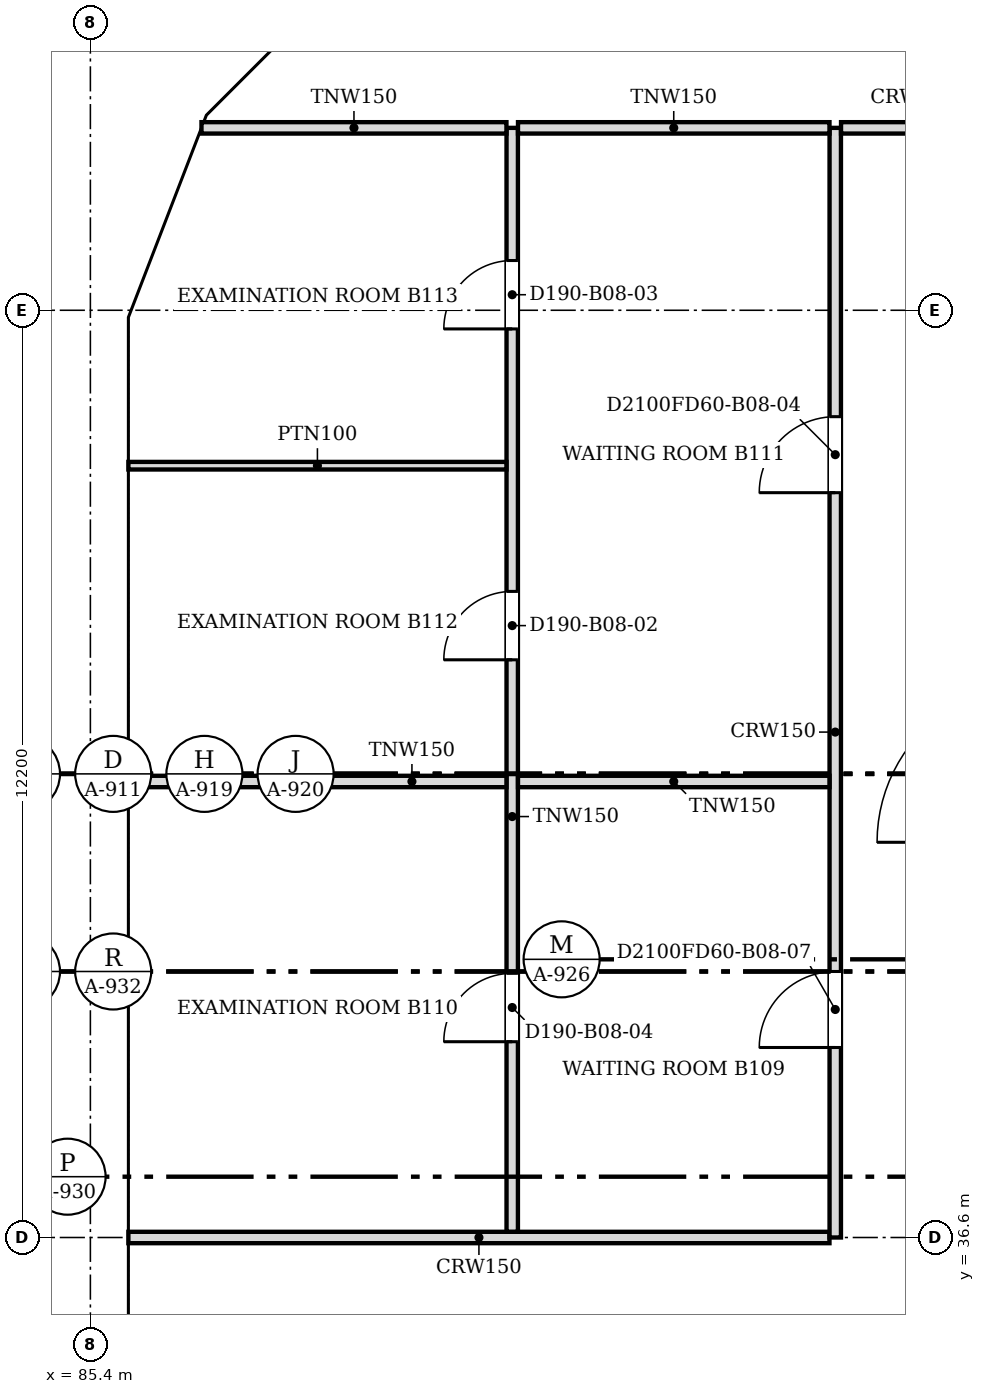
"""IFC4 building model, lengths in metres.
Left out: names, types, materials, properties, quantities, classifications, styles, units other than length and angle.
Written with IfcOpenShell. Run it as: python <this file> out.ifc"""

import sys

from ifc_helpers import new_model, si_unit, direction, frame, frame_2d, origin, place, context, subcontext, project, spatial, polyline, rectangle, outline, extrude, faceted_brep, source, transform, mapped, element, fill, save


model = new_model("IFC4")
c1 = context("Model", 3, precision=1e-05, world=origin(), true_north=direction((0.0, 1.0)))
c2 = subcontext(c1, "Body", "Model", "MODEL_VIEW")
j1 = project(units=[si_unit("LENGTHUNIT", "METRE"), si_unit("PLANEANGLEUNIT", "RADIAN")], contexts=[c1])
p1 = place(None, origin())
s1 = spatial("IfcSite", under=j1, at=p1, CompositionType="ELEMENT")
p2 = place(p1, origin())
s2 = spatial("IfcBuilding", under=s1, at=p2, CompositionType="ELEMENT")
p3 = place(p2, frame((0.0, 0.0, 80.0)))
s3 = spatial("IfcBuildingStorey", under=s2, at=p3, CompositionType="ELEMENT", Elevation=80.0)
m1 = source(origin(), c2, "Body", "Brep", [
    faceted_brep([(0.053, -0.25, 0.0), (2.997, -0.25, 3.8), (0.053, -0.25, 7.6), (0.0, -0.25, 7.532), (0.0, -0.25, 0.068), (0.106, 0.25, 7.532), (2.944, 0.25, 3.868), (2.944, 0.25, 3.732), (0.106, 0.25, 0.068), (2.997, 0.0, 3.8), (0.053, 0.0, 0.0), (0.053, 0.0, 7.6)], [[[0, 1, 2, 3, 4]], [[5, 6, 7, 8]], [[8, 7, 9, 1, 0, 10]], [[6, 5, 11, 2, 1, 9]], [[3, 2, 11]], [[10, 0, 4]], [[8, 10, 4, 3, 11, 5]], [[9, 7, 6]]]),
])
p4 = place(p3, frame((88.831, 53.625, -3.8), z_axis=(0.0, 0.0, 1.0), x_axis=(-0.707147509625, -0.707066050402, 0.0)))
e1 = element("IfcWall", 1, at=p4, inside=s3, PredefinedType="SOLIDWALL", context=c2, shape_type="MappedRepresentation", body=[
    mapped(m1, transform((0.0, 0.0, 0.0), scale=1.0)),
])
m2 = source(origin(), c2, "Body", "SweptSolid", [
    extrude(outline(polyline([(0.253, 0.666), (2.681, 3.8), (0.253, 6.934), (0.253, 0.666)])), frame((0.0, 0.26, 0.0), z_axis=(0.0, -1.0, 0.0), x_axis=(1.0, 0.0, 0.0)), (0.0, 0.0, 1.0), 0.52),
])
p5 = place(p4, origin())
e2 = element("IfcOpeningElement", 2, at=p5, cuts=e1, PredefinedType="OPENING", context=c2, shape_type="MappedRepresentation", body=[
    mapped(m2, transform((0.0, 0.0, 0.0), scale=1.0)),
])
m3 = source(origin(), c2, "Body", "Brep", [
    faceted_brep([(2.95, -0.25, 0.0), (2.997, -0.25, 0.059), (2.997, -0.25, 7.541), (2.95, -0.25, 7.6), (0.0, -0.25, 3.8), (0.053, 0.25, 3.868), (2.904, 0.25, 7.54), (2.904, 0.25, 0.06), (0.053, 0.25, 3.732), (2.95, 0.0, 0.0), (2.95, 0.0, 7.6), (0.0, 0.0, 3.8)], [[[0, 1, 2, 3, 4]], [[5, 6, 7, 8]], [[1, 0, 9]], [[10, 3, 2]], [[6, 5, 11, 4, 3, 10]], [[8, 7, 9, 0, 4, 11]], [[8, 11, 5]], [[1, 9, 7, 6, 10, 2]]]),
])
p6 = place(p3, frame((86.712, 51.506, -3.8), z_axis=(0.0, 0.0, 1.0), x_axis=(-0.359874094142, -0.933000876937, 0.0)))
e3 = element("IfcWall", 3, at=p6, inside=s3, PredefinedType="SOLIDWALL", context=c2, shape_type="MappedRepresentation", body=[
    mapped(m3, transform((0.0, 0.0, 0.0), scale=1.0)),
])
m4 = source(origin(), c2, "Body", "SweptSolid", [
    extrude(outline(polyline([(2.75, 6.935), (0.316, 3.8), (2.75, 0.665), (2.75, 6.935)])), frame((0.0, 0.26, 0.0), z_axis=(0.0, -1.0, 0.0), x_axis=(1.0, 0.0, 0.0)), (0.0, 0.0, 1.0), 0.52),
])
p7 = place(p6, origin())
e4 = element("IfcOpeningElement", 4, at=p7, cuts=e3, PredefinedType="OPENING", context=c2, shape_type="MappedRepresentation", body=[
    mapped(m4, transform((0.0, 0.0, 0.0), scale=1.0)),
])
m5 = source(origin(), c2, "Body", "Brep", [
    faceted_brep([(0.047, -0.25, 0.0), (3.05, -0.25, 3.8), (0.047, -0.25, 7.6), (0.0, -0.25, 7.54), (0.0, -0.25, 0.06), (0.093, 0.25, 7.541), (3.05, 0.25, 3.8), (0.093, 0.25, 0.059), (0.047, 0.0, 0.0), (0.047, 0.0, 7.6)], [[[0, 1, 2, 3, 4]], [[5, 6, 7]], [[7, 6, 1, 0, 8]], [[6, 5, 9, 2, 1]], [[3, 2, 9]], [[8, 0, 4]], [[7, 8, 4, 3, 9, 5]]]),
])
p8 = place(p3, frame((85.65, 48.8, -3.8), z_axis=(0.0, 0.0, 1.0), x_axis=(0.0, -1.0, 0.0)))
e5 = element("IfcWall", 5, at=p8, inside=s3, PredefinedType="SOLIDWALL", context=c2, shape_type="MappedRepresentation", body=[
    mapped(m5, transform((0.0, 0.0, 0.0), scale=1.0)),
])
m6 = source(origin(), c2, "Body", "SweptSolid", [
    extrude(outline(polyline([(0.247, 0.656), (2.731, 3.8), (0.247, 6.944), (0.247, 0.656)])), frame((0.0, 0.26, 0.0), z_axis=(0.0, -1.0, 0.0), x_axis=(1.0, 0.0, 0.0)), (0.0, 0.0, 1.0), 0.52),
])
p9 = place(p8, origin())
e6 = element("IfcOpeningElement", 6, at=p9, cuts=e5, PredefinedType="OPENING", context=c2, shape_type="MappedRepresentation", body=[
    mapped(m6, transform((0.0, 0.0, 0.0), scale=1.0)),
])
m7 = source(origin(), c2, "Body", "SweptSolid", [
    extrude(outline(polyline([(3.05, 0.0), (6.1, 3.8), (3.05, 7.6), (0.0, 3.8), (3.05, 0.0)])), frame((0.0, 0.25, 0.0), z_axis=(0.0, -1.0, 0.0), x_axis=(1.0, 0.0, 0.0)), (0.0, 0.0, 1.0), 0.5),
])
p10 = place(p3, frame((85.65, 45.75, -3.8), z_axis=(0.0, 0.0, 1.0), x_axis=(0.0, -1.0, 0.0)))
e7 = element("IfcWall", 7, at=p10, inside=s3, PredefinedType="SOLIDWALL", context=c2, shape_type="MappedRepresentation", body=[
    mapped(m7, transform((0.0, 0.0, 0.0), scale=1.0)),
])
m8 = source(origin(), c2, "Body", "SweptSolid", [
    extrude(outline(polyline([(3.05, 0.399), (5.78, 3.8), (3.05, 7.201), (0.321, 3.8), (3.05, 0.399)])), frame((0.0, 0.26, 0.0), z_axis=(0.0, -1.0, 0.0), x_axis=(1.0, 0.0, 0.0)), (0.0, 0.0, 1.0), 0.52),
])
p11 = place(p10, origin())
e8 = element("IfcOpeningElement", 8, at=p11, cuts=e7, PredefinedType="OPENING", context=c2, shape_type="MappedRepresentation", body=[
    mapped(m8, transform((0.0, 0.0, 0.0), scale=1.0)),
])
m9 = source(origin(), c2, "Body", "Brep", [
    faceted_brep([(3.05, -0.25, 0.0), (6.1, -0.25, 3.8), (6.1, -0.25, 3.8), (3.05, -0.25, 7.6), (0.0, -0.25, 3.8), (0.0, 0.25, 3.8), (3.05, 0.25, 7.6), (6.1, 0.25, 3.8), (6.1, 0.25, 3.8), (3.05, 0.25, 0.0)], [[[0, 1, 2, 3, 4]], [[5, 6, 7, 8, 9]], [[9, 8, 1, 0]], [[7, 6, 3, 2]], [[6, 5, 4, 3]], [[5, 9, 0, 4]], [[1, 8, 7, 2]]]),
])
p12 = place(p3, frame((85.65, 39.65, -3.8), z_axis=(0.0, 0.0, 1.0), x_axis=(0.0, -1.0, 0.0)))
e9 = element("IfcWall", 9, at=p12, inside=s3, PredefinedType="SOLIDWALL", context=c2, shape_type="MappedRepresentation", body=[
    mapped(m9, transform((0.0, 0.0, 0.0), scale=1.0)),
])
p13 = place(p12, origin())
e10 = element("IfcOpeningElement", 10, at=p13, cuts=e9, PredefinedType="OPENING", context=c2, shape_type="MappedRepresentation", body=[
    mapped(m8, transform((0.0, 0.0, 0.0), scale=1.0)),
])
p14 = place(p2, frame((0.0, 0.0, 83.8)))
s4 = spatial("IfcBuildingStorey", under=s2, at=p14, CompositionType="ELEMENT", Elevation=83.8)
m10 = source(origin(), c2, "Body", "Brep", [
    faceted_brep([(2.944, -0.25, 0.0), (2.997, -0.25, 0.068), (2.997, -0.25, 7.532), (2.944, -0.25, 7.6), (0.0, -0.25, 3.8), (0.053, 0.25, 3.868), (2.891, 0.25, 7.532), (2.891, 0.25, 0.068), (0.053, 0.25, 3.732), (2.944, 0.0, 0.0), (2.944, 0.0, 7.6), (0.0, 0.0, 3.8)], [[[0, 1, 2, 3, 4]], [[5, 6, 7, 8]], [[1, 0, 9]], [[10, 3, 2]], [[6, 5, 11, 4, 3, 10]], [[8, 7, 9, 0, 4, 11]], [[8, 11, 5]], [[1, 9, 7, 6, 10, 2]]]),
])
p15 = place(p14, frame((88.794, 53.588, -3.8), z_axis=(0.0, 0.0, 1.0), x_axis=(-0.707066050402, -0.707147509625, 0.0)))
e11 = element("IfcWall", 11, at=p15, inside=s4, PredefinedType="SOLIDWALL", context=c2, shape_type="MappedRepresentation", body=[
    mapped(m10, transform((0.0, 0.0, 0.0), scale=1.0)),
])
m11 = source(origin(), c2, "Body", "SweptSolid", [
    extrude(outline(polyline([(2.744, 6.934), (0.316, 3.8), (2.744, 0.666), (2.744, 6.934)])), frame((0.0, 0.26, 0.0), z_axis=(0.0, -1.0, 0.0), x_axis=(1.0, 0.0, 0.0)), (0.0, 0.0, 1.0), 0.52),
])
p16 = place(p15, origin())
e12 = element("IfcOpeningElement", 12, at=p16, cuts=e11, PredefinedType="OPENING", context=c2, shape_type="MappedRepresentation", body=[
    mapped(m11, transform((0.0, 0.0, 0.0), scale=1.0)),
])
m12 = source(origin(), c2, "Body", "Brep", [
    faceted_brep([(0.053, -0.25, 0.0), (3.003, -0.25, 3.8), (0.053, -0.25, 7.6), (0.0, -0.25, 7.532), (0.0, -0.25, 0.068), (0.106, 0.25, 7.532), (2.957, 0.25, 3.86), (2.957, 0.25, 3.74), (0.106, 0.25, 0.068), (3.003, 0.0, 3.8), (0.053, 0.0, 0.0), (0.053, 0.0, 7.6)], [[[0, 1, 2, 3, 4]], [[5, 6, 7, 8]], [[8, 7, 9, 1, 0, 10]], [[6, 5, 11, 2, 1, 9]], [[3, 2, 11]], [[10, 0, 4]], [[8, 10, 4, 3, 11, 5]], [[9, 7, 6]]]),
])
p17 = place(p14, frame((86.731, 51.556, -3.8), z_axis=(0.0, 0.0, 1.0), x_axis=(-0.359855894603, -0.933007896601, 0.0)))
e13 = element("IfcWall", 13, at=p17, inside=s4, PredefinedType="SOLIDWALL", context=c2, shape_type="MappedRepresentation", body=[
    mapped(m12, transform((0.0, 0.0, 0.0), scale=1.0)),
])
m13 = source(origin(), c2, "Body", "SweptSolid", [
    extrude(outline(polyline([(0.253, 0.665), (2.687, 3.8), (0.253, 6.935), (0.253, 0.665)])), frame((0.0, 0.26, 0.0), z_axis=(0.0, -1.0, 0.0), x_axis=(1.0, 0.0, 0.0)), (0.0, 0.0, 1.0), 0.52),
])
p18 = place(p17, origin())
e14 = element("IfcOpeningElement", 14, at=p18, cuts=e13, PredefinedType="OPENING", context=c2, shape_type="MappedRepresentation", body=[
    mapped(m13, transform((0.0, 0.0, 0.0), scale=1.0)),
])
m14 = source(origin(), c2, "Body", "Brep", [
    faceted_brep([(3.003, -0.25, 0.0), (6.053, -0.25, 3.8), (3.003, -0.25, 7.6), (0.0, -0.25, 3.8), (0.047, 0.25, 3.859), (3.003, 0.25, 7.6), (6.053, 0.25, 3.8), (3.003, 0.25, 0.0), (0.047, 0.25, 3.741), (0.0, 0.0, 3.8)], [[[0, 1, 2, 3]], [[4, 5, 6, 7, 8]], [[7, 6, 1, 0]], [[6, 5, 2, 1]], [[5, 4, 9, 3, 2]], [[8, 7, 0, 3, 9]], [[8, 9, 4]]]),
])
p19 = place(p14, frame((85.65, 48.753, -3.8), z_axis=(0.0, 0.0, 1.0), x_axis=(0.0, -1.0, 0.0)))
e15 = element("IfcWall", 15, at=p19, inside=s4, PredefinedType="SOLIDWALL", context=c2, shape_type="MappedRepresentation", body=[
    mapped(m14, transform((0.0, 0.0, 0.0), scale=1.0)),
])
m15 = source(origin(), c2, "Body", "SweptSolid", [
    extrude(outline(polyline([(3.005, 0.401), (5.733, 3.8), (3.005, 7.199), (0.319, 3.8), (3.005, 0.401)])), frame((0.0, 0.26, 0.0), z_axis=(0.0, -1.0, 0.0), x_axis=(1.0, 0.0, 0.0)), (0.0, 0.0, 1.0), 0.52),
])
p20 = place(p19, origin())
e16 = element("IfcOpeningElement", 16, at=p20, cuts=e15, PredefinedType="OPENING", context=c2, shape_type="MappedRepresentation", body=[
    mapped(m15, transform((0.0, 0.0, 0.0), scale=1.0)),
])
p21 = place(p14, frame((85.65, 42.7, -3.8), z_axis=(0.0, 0.0, 1.0), x_axis=(0.0, -1.0, 0.0)))
e17 = element("IfcWall", 17, at=p21, inside=s4, PredefinedType="SOLIDWALL", context=c2, shape_type="MappedRepresentation", body=[
    mapped(m9, transform((0.0, 0.0, 0.0), scale=1.0)),
])
p22 = place(p21, origin())
e18 = element("IfcOpeningElement", 18, at=p22, cuts=e17, PredefinedType="OPENING", context=c2, shape_type="MappedRepresentation", body=[
    mapped(m8, transform((0.0, 0.0, 0.0), scale=1.0)),
])
p23 = place(p14, frame((85.65, 36.6, -3.8), z_axis=(0.0, 0.0, 1.0), x_axis=(0.0, -1.0, 0.0)))
e19 = element("IfcWall", 19, at=p23, inside=s4, PredefinedType="SOLIDWALL", context=c2, shape_type="MappedRepresentation", body=[
    mapped(m7, transform((0.0, 0.0, 0.0), scale=1.0)),
])
p24 = place(p23, origin())
e20 = element("IfcOpeningElement", 20, at=p24, cuts=e19, PredefinedType="OPENING", context=c2, shape_type="MappedRepresentation", body=[
    mapped(m8, transform((0.0, 0.0, 0.0), scale=1.0)),
])
p25 = place(p3, frame((85.9, 36.6, 0.0), z_axis=(0.0, 0.0, 1.0), x_axis=(1.0, 0.0, 0.0)))
e21 = element("IfcWall", 21, at=p25, inside=s3, PredefinedType="PARTITIONING", context=c2, shape_type="SweptSolid", body=[
    extrude(rectangle(XDim=9.224, YDim=0.15, at=frame_2d((4.612, 0.0))), origin(), (0.0, 0.0, 1.0), 3.067),
])
p26 = place(p3, frame((95.2, 36.6, 0.0), z_axis=(0.0, 0.0, 1.0), x_axis=(0.0, 1.0, 0.0)))
e22 = element("IfcWall", 22, at=p26, inside=s3, PredefinedType="PARTITIONING", context=c2, shape_type="SweptSolid", body=[
    extrude(rectangle(XDim=14.6, YDim=0.15, at=frame_2d((7.3, 0.0))), origin(), (0.0, 0.0, 1.0), 3.067),
])
m16 = source(origin(), c2, "Body", "SweptSolid", [
    extrude(rectangle(XDim=1.0, YDim=2.1, at=frame_2d((0.5, 1.05))), frame((0.0, 0.085, 0.0), z_axis=(0.0, -1.0, 0.0), x_axis=(1.0, 0.0, 0.0)), (0.0, 0.0, 1.0), 0.17),
])
p27 = place(p26, frame((9.8, 0.0, 0.0)))
e23 = element("IfcOpeningElement", 23, at=p27, cuts=e22, PredefinedType="OPENING", context=c2, shape_type="MappedRepresentation", body=[
    mapped(m16, transform((0.0, 0.0, 0.0), scale=1.0)),
])
p28 = place(p26, frame((2.5, 0.0, 0.0)))
e24 = element("IfcOpeningElement", 24, at=p28, cuts=e22, PredefinedType="OPENING", context=c2, shape_type="MappedRepresentation", body=[
    mapped(m16, transform((0.0, 0.0, 0.0), scale=1.0)),
])
p29 = place(p3, frame((90.95, 36.676, 0.0), z_axis=(0.0, 0.0, 1.0), x_axis=(0.0, 1.0, 0.0)))
e25 = element("IfcWall", 25, at=p29, inside=s3, PredefinedType="PARTITIONING", context=c2, shape_type="SweptSolid", body=[
    extrude(rectangle(XDim=14.524, YDim=0.15, at=frame_2d((7.262, 0.0))), origin(), (0.0, 0.0, 1.0), 3.067),
])
m17 = source(origin(), c2, "Body", "SweptSolid", [
    extrude(rectangle(XDim=0.9, YDim=2.1, at=frame_2d((0.45, 1.05))), frame((0.0, 0.085, 0.0), z_axis=(0.0, -1.0, 0.0), x_axis=(1.0, 0.0, 0.0)), (0.0, 0.0, 1.0), 0.17),
])
p30 = place(p29, frame((7.525, 0.0, 0.0)))
e26 = element("IfcOpeningElement", 26, at=p30, cuts=e25, PredefinedType="OPENING", context=c2, shape_type="MappedRepresentation", body=[
    mapped(m17, transform((0.0, 0.0, 0.0), scale=1.0)),
])
p31 = place(p29, frame((11.879, 0.0, 0.0)))
e27 = element("IfcOpeningElement", 27, at=p31, cuts=e25, PredefinedType="OPENING", context=c2, shape_type="MappedRepresentation", body=[
    mapped(m17, transform((0.0, 0.0, 0.0), scale=1.0)),
])
p32 = place(p29, frame((2.5, 0.0, 0.0)))
e28 = element("IfcOpeningElement", 28, at=p32, cuts=e25, PredefinedType="OPENING", context=c2, shape_type="MappedRepresentation", body=[
    mapped(m17, transform((0.0, 0.0, 0.0), scale=1.0)),
])
p33 = place(p3, frame((85.9, 42.6, 0.0), z_axis=(0.0, 0.0, 1.0), x_axis=(1.0, 0.0, 0.0)))
e29 = element("IfcWall", 29, at=p33, inside=s3, PredefinedType="PARTITIONING", context=c2, shape_type="SweptSolid", body=[
    extrude(rectangle(XDim=4.974, YDim=0.15, at=frame_2d((2.487, 0.0))), origin(), (0.0, 0.0, 1.0), 3.067),
])
p34 = place(p3, frame((91.026, 42.6, 0.0), z_axis=(0.0, 0.0, 1.0), x_axis=(1.0, 0.0, 0.0)))
e30 = element("IfcWall", 30, at=p34, inside=s3, PredefinedType="PARTITIONING", context=c2, shape_type="SweptSolid", body=[
    extrude(rectangle(XDim=4.098, YDim=0.15, at=frame_2d((2.049, 0.0))), origin(), (0.0, 0.0, 1.0), 3.067),
])
p35 = place(p3, frame((85.9, 46.755, 0.0), z_axis=(0.0, 0.0, 1.0), x_axis=(1.0, 0.0, 0.0)))
e31 = element("IfcWall", 31, at=p35, inside=s3, PredefinedType="PARTITIONING", context=c2, shape_type="SweptSolid", body=[
    extrude(rectangle(XDim=4.974, YDim=0.1, at=frame_2d((2.487, 0.0))), origin(), (0.0, 0.0, 1.0), 3.067),
])
p36 = place(p3, frame((86.862, 51.2, 0.0), z_axis=(0.0, 0.0, 1.0), x_axis=(1.0, 0.0, 0.0)))
e32 = element("IfcWall", 32, at=p36, inside=s3, PredefinedType="PARTITIONING", context=c2, shape_type="SweptSolid", body=[
    extrude(rectangle(XDim=4.012, YDim=0.15, at=frame_2d((2.006, 0.0))), origin(), (0.0, 0.0, 1.0), 3.067),
])
p37 = place(p3, frame((91.026, 51.2, 0.0), z_axis=(0.0, 0.0, 1.0), x_axis=(1.0, 0.0, 0.0)))
e33 = element("IfcWall", 33, at=p37, inside=s3, PredefinedType="PARTITIONING", context=c2, shape_type="SweptSolid", body=[
    extrude(rectangle(XDim=4.098, YDim=0.15, at=frame_2d((2.049, 0.0))), origin(), (0.0, 0.0, 1.0), 3.067),
])
p38 = place(p3, frame((95.276, 51.2, 0.0), z_axis=(0.0, 0.0, 1.0), x_axis=(1.0, 0.0, 0.0)))
e34 = element("IfcWall", 34, at=p38, inside=s3, PredefinedType="PARTITIONING", context=c2, shape_type="SweptSolid", body=[
    extrude(rectangle(XDim=4.724, YDim=0.15, at=frame_2d((2.362, 0.0))), origin(), (0.0, 0.0, 1.0), 3.067),
])
p39 = place(p38, frame((1.9, 0.0, 0.0)))
e35 = element("IfcOpeningElement", 35, at=p39, cuts=e34, PredefinedType="OPENING", context=c2, shape_type="MappedRepresentation", body=[
    mapped(m16, transform((0.0, 0.0, 0.0), scale=1.0)),
])
m18 = source(origin(), c2, "Body", "SweptSolid", [
    extrude(rectangle(XDim=0.9, YDim=2.1, at=frame_2d((0.45, 1.05))), frame((0.0, 0.025, 0.0), z_axis=(0.0, -1.0, 0.0), x_axis=(1.0, 0.0, 0.0)), (0.0, 0.0, 1.0), 0.05),
])
p40 = place(p30, origin())
e36 = element("IfcDoor", 36, at=p40, inside=s3, OperationType="SINGLE_SWING_LEFT", PredefinedType="DOOR", context=c2, shape_type="MappedRepresentation", body=[
    mapped(m18, transform((0.0, 0.0, 0.0), scale=1.0)),
])
fill(e26, e36)
p41 = place(p31, origin())
e37 = element("IfcDoor", 37, at=p41, inside=s3, OperationType="SINGLE_SWING_LEFT", PredefinedType="DOOR", context=c2, shape_type="MappedRepresentation", body=[
    mapped(m18, transform((0.0, 0.0, 0.0), scale=1.0)),
])
fill(e27, e37)
p42 = place(p32, origin())
e38 = element("IfcDoor", 38, at=p42, inside=s3, OperationType="SINGLE_SWING_LEFT", PredefinedType="DOOR", context=c2, shape_type="MappedRepresentation", body=[
    mapped(m18, transform((0.0, 0.0, 0.0), scale=1.0)),
])
fill(e28, e38)
m19 = source(origin(), c2, "Body", "SweptSolid", [
    extrude(rectangle(XDim=1.0, YDim=2.1, at=frame_2d((0.5, 1.05))), frame((0.0, 0.025, 0.0), z_axis=(0.0, -1.0, 0.0), x_axis=(1.0, 0.0, 0.0)), (0.0, 0.0, 1.0), 0.05),
])
p43 = place(p27, origin())
e39 = element("IfcDoor", 39, at=p43, inside=s3, OperationType="SINGLE_SWING_LEFT", PredefinedType="DOOR", context=c2, shape_type="MappedRepresentation", body=[
    mapped(m19, transform((0.0, 0.0, 0.0), scale=1.0)),
])
fill(e23, e39)
p44 = place(p28, origin())
e40 = element("IfcDoor", 40, at=p44, inside=s3, OperationType="SINGLE_SWING_LEFT", PredefinedType="DOOR", context=c2, shape_type="MappedRepresentation", body=[
    mapped(m19, transform((0.0, 0.0, 0.0), scale=1.0)),
])
fill(e24, e40)
save(model, sys.argv[1])
